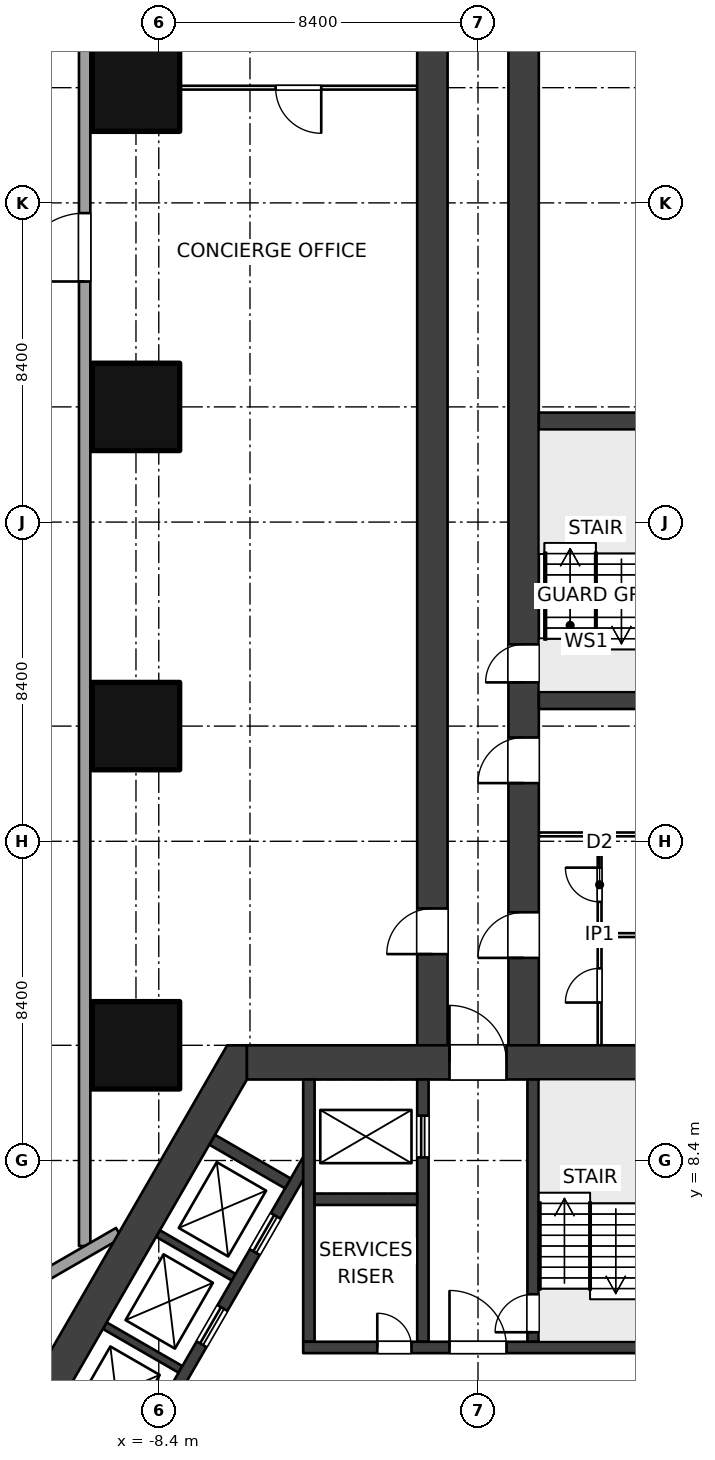
"""IFC4 building model, lengths in metres.
Left out: names, types, materials, properties, quantities, classifications, styles, units other than length and angle.
Written with IfcOpenShell. Run it as: python <this file> out.ifc"""

import sys

from ifc_helpers import new_model, si_unit, direction, frame, frame_2d, origin, origin_2d, place, context, subcontext, project, spatial, polyline, rectangle, outline, extrude, element, fill, save


model = new_model("IFC4")
c1 = context("Model", 3, precision=1e-05, world=origin(), true_north=direction((0.0, 1.0)))
c2 = subcontext(c1, "Body", "Model", "MODEL_VIEW")
j1 = project(units=[si_unit("LENGTHUNIT", "METRE"), si_unit("PLANEANGLEUNIT", "RADIAN")], contexts=[c1])
p1 = place(None, origin())
s1 = spatial("IfcSite", under=j1, at=p1, CompositionType="ELEMENT")
p2 = place(p1, origin())
s2 = spatial("IfcBuilding", under=s1, at=p2, CompositionType="ELEMENT")
p3 = place(p2, origin())
s3 = spatial("IfcBuildingStorey", under=s2, at=p3, CompositionType="ELEMENT", Elevation=0.0)
for number, where, z_axis, x_axis in (
    (1, (-9.0, 11.432, 0.0), (0.0, 0.0, 1.0), (1.0, 0.0, 0.0)),
    (2, (-9.0, 19.832, 0.0), (0.0, 0.0, 1.0), (1.0, 0.0, 0.0)),
    (3, (-9.0, 28.231, 0.0), (0.0, 0.0, 1.0), (1.0, 0.0, 0.0)),
    (4, (-9.0, 36.632, 0.0), (0.0, 0.0, 1.0), (1.0, 0.0, 0.0)),
):
    element("IfcColumn", number, at=place(p3, frame(where, z_axis=z_axis, x_axis=x_axis)), inside=s3, PredefinedType="COLUMN", context=c2, shape_type="SweptSolid", body=[
        extrude(rectangle(XDim=2.3, YDim=2.3, at=origin_2d()), origin(), (0.0, 0.0, 1.0), 6.0),
    ])
p4 = place(p3, frame((-6.08, 10.981, 0.0), z_axis=(0.0, 0.0, 1.0), x_axis=(1.0, 0.0, 0.0)))
e5 = element("IfcWall", 5, at=p4, inside=s3, PredefinedType="SHEAR", context=c2, shape_type="SweptSolid", body=[
    extrude(rectangle(XDim=12.161, YDim=0.9, at=frame_2d((6.08, 0.0))), origin(), (0.0, 0.0, 1.0), 6.0),
])
p5 = place(p4, frame((5.33, 0.0, 0.0)))
e6 = element("IfcOpeningElement", 6, at=p5, cuts=e5, PredefinedType="OPENING", context=c2, shape_type="SweptSolid", body=[
    extrude(rectangle(XDim=1.5, YDim=2.1, at=frame_2d((0.75, 1.05))), frame((0.0, 0.46, 0.0), z_axis=(0.0, -1.0, 0.0), x_axis=(1.0, 0.0, 0.0)), (0.0, 0.0, 1.0), 0.92),
])
p6 = place(p3, origin())
e7 = element("IfcWall", 7, at=p6, inside=s3, PredefinedType="SHEAR", context=c2, shape_type="SweptSolid", body=[
    extrude(outline(polyline([(-6.6, 11.432), (-13.2, 0.0), (-12.94, -0.45), (-12.161, 0.0), (-6.08, 10.531), (-6.08, 11.432), (-6.6, 11.432)])), origin(), (0.0, 0.0, 1.0), 6.0),
])
p7 = place(p3, frame((-4.6, 3.48, 0.0), z_axis=(0.0, 0.0, 1.0), x_axis=(1.0, 0.0, 0.0)))
e8 = element("IfcWall", 8, at=p7, inside=s3, PredefinedType="SHEAR", context=c2, shape_type="SweptSolid", body=[
    extrude(rectangle(XDim=9.2, YDim=0.3, at=frame_2d((4.6, 0.0))), origin(), (0.0, 0.0, 1.0), 6.0),
])
p8 = place(p7, frame((3.85, 0.0, 0.0)))
e9 = element("IfcOpeningElement", 9, at=p8, cuts=e8, PredefinedType="OPENING", context=c2, shape_type="SweptSolid", body=[
    extrude(rectangle(XDim=1.5, YDim=2.1, at=frame_2d((0.75, 1.05))), frame((0.0, 0.16, 0.0), z_axis=(0.0, -1.0, 0.0), x_axis=(1.0, 0.0, 0.0)), (0.0, 0.0, 1.0), 0.32),
])
p9 = place(p7, frame((1.95, 0.0, 0.0)))
e10 = element("IfcOpeningElement", 10, at=p9, cuts=e8, PredefinedType="OPENING", context=c2, shape_type="SweptSolid", body=[
    extrude(rectangle(XDim=0.9, YDim=2.1, at=frame_2d((0.45, 1.05))), frame((0.0, 0.16, 0.0), z_axis=(0.0, -1.0, 0.0), x_axis=(1.0, 0.0, 0.0)), (0.0, 0.0, 1.0), 0.32),
])
p10 = place(p3, frame((1.45, 3.63, 0.0), z_axis=(0.0, 0.0, 1.0), x_axis=(0.0, 1.0, 0.0)))
e11 = element("IfcWall", 11, at=p10, inside=s3, PredefinedType="SHEAR", context=c2, shape_type="SweptSolid", body=[
    extrude(rectangle(XDim=6.902, YDim=0.3, at=frame_2d((3.451, 0.0))), origin(), (0.0, 0.0, 1.0), 6.0),
])
p11 = place(p10, frame((0.25, 0.0, 0.0)))
e12 = element("IfcOpeningElement", 12, at=p11, cuts=e11, PredefinedType="OPENING", context=c2, shape_type="SweptSolid", body=[
    extrude(rectangle(XDim=1.0, YDim=2.1, at=frame_2d((0.5, 1.05))), frame((0.0, 0.16, 0.0), z_axis=(0.0, -1.0, 0.0), x_axis=(1.0, 0.0, 0.0)), (0.0, 0.0, 1.0), 0.32),
])
p12 = place(p3, frame((-1.45, 3.63, 0.0), z_axis=(0.0, 0.0, 1.0), x_axis=(0.0, 1.0, 0.0)))
e13 = element("IfcWall", 13, at=p12, inside=s3, PredefinedType="SHEAR", context=c2, shape_type="SweptSolid", body=[
    extrude(rectangle(XDim=6.902, YDim=0.3, at=frame_2d((3.451, 0.0))), origin(), (0.0, 0.0, 1.0), 6.0),
])
p13 = place(p12, frame((4.85, 0.0, 0.0)))
e14 = element("IfcOpeningElement", 14, at=p13, cuts=e13, PredefinedType="OPENING", context=c2, shape_type="SweptSolid", body=[
    extrude(rectangle(XDim=1.1, YDim=2.1, at=frame_2d((0.55, 1.05))), frame((0.0, 0.16, 0.0), z_axis=(0.0, -1.0, 0.0), x_axis=(1.0, 0.0, 0.0)), (0.0, 0.0, 1.0), 0.32),
])
p14 = place(p3, frame((-4.45, 3.63, 0.0), z_axis=(0.0, 0.0, 1.0), x_axis=(0.0, 1.0, 0.0)))
e15 = element("IfcWall", 15, at=p14, inside=s3, PredefinedType="SHEAR", context=c2, shape_type="SweptSolid", body=[
    extrude(rectangle(XDim=6.902, YDim=0.3, at=frame_2d((3.451, 0.0))), origin(), (0.0, 0.0, 1.0), 6.0),
])
p15 = place(p3, frame((-4.3, 7.38, 0.0), z_axis=(0.0, 0.0, 1.0), x_axis=(1.0, 0.0, 0.0)))
e16 = element("IfcWall", 16, at=p15, inside=s3, PredefinedType="SHEAR", context=c2, shape_type="SweptSolid", body=[
    extrude(rectangle(XDim=2.7, YDim=0.3, at=frame_2d((1.35, 0.0))), origin(), (0.0, 0.0, 1.0), 6.0),
])
p16 = place(p3, frame((-9.548, -0.374, 0.0), z_axis=(0.0, 0.0, 1.0), x_axis=(0.500002290144, 0.866024081565, 0.0)))
e17 = element("IfcWall", 17, at=p16, inside=s3, PredefinedType="SHEAR", context=c2, shape_type="SweptSolid", body=[
    extrude(rectangle(XDim=10.195, YDim=0.3, at=frame_2d((5.098, 0.0))), origin(), (0.0, 0.0, 1.0), 6.0),
])
p17 = place(p16, frame((1.748, 0.0, 0.0)))
e18 = element("IfcOpeningElement", 18, at=p17, cuts=e17, PredefinedType="OPENING", context=c2, shape_type="SweptSolid", body=[
    extrude(rectangle(XDim=1.1, YDim=2.1, at=frame_2d((0.55, 1.05))), frame((0.0, 0.16, 0.0), z_axis=(0.0, -1.0, 0.0), x_axis=(1.0, 0.0, 0.0)), (0.0, 0.0, 1.0), 0.32),
])
p18 = place(p16, frame((4.548, 0.0, 0.0)))
e19 = element("IfcOpeningElement", 19, at=p18, cuts=e17, PredefinedType="OPENING", context=c2, shape_type="SweptSolid", body=[
    extrude(rectangle(XDim=1.1, YDim=2.1, at=frame_2d((0.55, 1.05))), frame((0.0, 0.16, 0.0), z_axis=(0.0, -1.0, 0.0), x_axis=(1.0, 0.0, 0.0)), (0.0, 0.0, 1.0), 0.32),
])
p19 = place(p16, frame((7.348, 0.0, 0.0)))
e20 = element("IfcOpeningElement", 20, at=p19, cuts=e17, PredefinedType="OPENING", context=c2, shape_type="SweptSolid", body=[
    extrude(rectangle(XDim=1.1, YDim=2.1, at=frame_2d((0.55, 1.05))), frame((0.0, 0.16, 0.0), z_axis=(0.0, -1.0, 0.0), x_axis=(1.0, 0.0, 0.0)), (0.0, 0.0, 1.0), 0.32),
])
p20 = place(p3, frame((-5.004, 7.796, 0.0), z_axis=(0.0, 0.0, 1.0), x_axis=(-0.866053019151, 0.499952165731, 0.0)))
e21 = element("IfcWall", 21, at=p20, inside=s3, PredefinedType="SHEAR", context=c2, shape_type="SweptSolid", body=[
    extrude(rectangle(XDim=2.3, YDim=0.3, at=frame_2d((1.15, 0.0))), origin(), (0.0, 0.0, 1.0), 6.0),
])
for number, where, z_axis, x_axis in (
    (22, (-7.829, 2.903, 0.0), (0.0, 0.0, 1.0), (-0.866, 0.5, 0.0)),
    (23, (-6.429, 5.328, 0.0), (0.0, 0.0, 1.0), (-0.866, 0.5, 0.0)),
):
    element("IfcWall", number, at=place(p3, frame(where, z_axis=z_axis, x_axis=x_axis)), inside=s3, PredefinedType="SHEAR", context=c2, shape_type="SweptSolid", body=[
        extrude(rectangle(XDim=2.3, YDim=0.2, at=frame_2d((1.15, 0.0))), origin(), (0.0, 0.0, 1.0), 6.0),
    ])
p21 = place(p3, frame((-1.2, 10.981, 0.0), z_axis=(0.0, 0.0, 1.0), x_axis=(0.0, 1.0, 0.0)))
e24 = element("IfcWall", 24, at=p21, inside=s3, PredefinedType="SHEAR", context=c2, shape_type="SweptSolid", body=[
    extrude(rectangle(XDim=36.75, YDim=0.8, at=frame_2d((18.375, 0.0))), origin(), (0.0, 0.0, 1.0), 6.0),
])
p22 = place(p21, frame((2.85, 0.0, 0.0)))
e25 = element("IfcOpeningElement", 25, at=p22, cuts=e24, PredefinedType="OPENING", context=c2, shape_type="SweptSolid", body=[
    extrude(rectangle(XDim=1.2, YDim=2.1, at=frame_2d((0.6, 1.05))), frame((0.0, 0.41, 0.0), z_axis=(0.0, -1.0, 0.0), x_axis=(1.0, 0.0, 0.0)), (0.0, 0.0, 1.0), 0.82),
])
p23 = place(p3, frame((1.2, 10.981, 0.0), z_axis=(0.0, 0.0, 1.0), x_axis=(0.0, 1.0, 0.0)))
e26 = element("IfcWall", 26, at=p23, inside=s3, PredefinedType="SHEAR", context=c2, shape_type="SweptSolid", body=[
    extrude(rectangle(XDim=36.75, YDim=0.8, at=frame_2d((18.375, 0.0))), origin(), (0.0, 0.0, 1.0), 6.0),
])
p24 = place(p23, frame((10.0, 0.0, 0.0)))
e27 = element("IfcOpeningElement", 27, at=p24, cuts=e26, PredefinedType="OPENING", context=c2, shape_type="SweptSolid", body=[
    extrude(rectangle(XDim=1.0, YDim=2.1, at=frame_2d((0.5, 1.05))), frame((0.0, 0.41, 0.0), z_axis=(0.0, -1.0, 0.0), x_axis=(1.0, 0.0, 0.0)), (0.0, 0.0, 1.0), 0.82),
])
p25 = place(p23, frame((2.75, 0.0, 0.0)))
e28 = element("IfcOpeningElement", 28, at=p25, cuts=e26, PredefinedType="OPENING", context=c2, shape_type="SweptSolid", body=[
    extrude(rectangle(XDim=1.2, YDim=2.1, at=frame_2d((0.6, 1.05))), frame((0.0, 0.41, 0.0), z_axis=(0.0, -1.0, 0.0), x_axis=(1.0, 0.0, 0.0)), (0.0, 0.0, 1.0), 0.82),
])
p26 = place(p23, frame((7.35, 0.0, 0.0)))
e29 = element("IfcOpeningElement", 29, at=p26, cuts=e26, PredefinedType="OPENING", context=c2, shape_type="SweptSolid", body=[
    extrude(rectangle(XDim=1.2, YDim=2.1, at=frame_2d((0.6, 1.05))), frame((0.0, 0.41, 0.0), z_axis=(0.0, -1.0, 0.0), x_axis=(1.0, 0.0, 0.0)), (0.0, 0.0, 1.0), 0.82),
])
p27 = place(p3, frame((-1.6, 36.632, 0.0), z_axis=(0.0, 0.0, 1.0), x_axis=(-1.0, 0.0, 0.0)))
e30 = element("IfcWall", 30, at=p27, inside=s3, PredefinedType="PARTITIONING", context=c2, shape_type="SweptSolid", body=[
    extrude(rectangle(XDim=6.25, YDim=0.1, at=frame_2d((3.125, 0.0))), origin(), (0.0, 0.0, 1.0), 3.9),
])
p28 = place(p27, frame((2.525, 0.0, 0.0)))
e31 = element("IfcOpeningElement", 31, at=p28, cuts=e30, PredefinedType="OPENING", context=c2, shape_type="SweptSolid", body=[
    extrude(rectangle(XDim=1.2, YDim=2.1, at=frame_2d((0.6, 1.05))), frame((0.0, 0.06, 0.0), z_axis=(0.0, -1.0, 0.0), x_axis=(1.0, 0.0, 0.0)), (0.0, 0.0, 1.0), 0.12),
])
p29 = place(p3, frame((3.2, 11.432, 0.0), z_axis=(0.0, 0.0, 1.0), x_axis=(0.0, 1.0, 0.0)))
e32 = element("IfcWall", 32, at=p29, inside=s3, PredefinedType="PARTITIONING", context=c2, shape_type="SweptSolid", body=[
    extrude(rectangle(XDim=5.6, YDim=0.1, at=frame_2d((2.8, 0.0))), origin(), (0.0, 0.0, 1.0), 5.7),
])
p30 = place(p29, frame((1.125, 0.0, 0.0)))
e33 = element("IfcOpeningElement", 33, at=p30, cuts=e32, PredefinedType="OPENING", context=c2, shape_type="SweptSolid", body=[
    extrude(rectangle(XDim=0.9, YDim=2.1, at=frame_2d((0.45, 1.05))), frame((0.0, 0.06, 0.0), z_axis=(0.0, -1.0, 0.0), x_axis=(1.0, 0.0, 0.0)), (0.0, 0.0, 1.0), 0.12),
])
p31 = place(p29, frame((3.775, 0.0, 0.0)))
e34 = element("IfcOpeningElement", 34, at=p31, cuts=e32, PredefinedType="OPENING", context=c2, shape_type="SweptSolid", body=[
    extrude(rectangle(XDim=0.9, YDim=2.1, at=frame_2d((0.45, 1.05))), frame((0.0, 0.06, 0.0), z_axis=(0.0, -1.0, 0.0), x_axis=(1.0, 0.0, 0.0)), (0.0, 0.0, 1.0), 0.12),
])
p32 = place(p3, frame((3.25, 14.332, 0.0), z_axis=(0.0, 0.0, 1.0), x_axis=(1.0, 0.0, 0.0)))
e35 = element("IfcWall", 35, at=p32, inside=s3, PredefinedType="PARTITIONING", context=c2, shape_type="SweptSolid", body=[
    extrude(rectangle(XDim=1.5, YDim=0.1, at=frame_2d((0.75, 0.0))), origin(), (0.0, 0.0, 1.0), 5.7),
])
p33 = place(p3, frame((1.6, 16.981, 0.0), z_axis=(0.0, 0.0, 1.0), x_axis=(1.0, 0.0, 0.0)))
e36 = element("IfcWall", 36, at=p33, inside=s3, PredefinedType="PARTITIONING", context=c2, shape_type="SweptSolid", body=[
    extrude(rectangle(XDim=3.15, YDim=0.1, at=frame_2d((1.575, 0.0))), origin(), (0.0, 0.0, 1.0), 5.7),
])
p34 = place(p3, frame((-10.35, 6.149, 0.0), z_axis=(0.0, 0.0, 1.0), x_axis=(0.0, 1.0, 0.0)))
e37 = element("IfcWall", 37, at=p34, inside=s3, PredefinedType="SOLIDWALL", context=c2, shape_type="SweptSolid", body=[
    extrude(rectangle(XDim=41.883, YDim=0.3, at=frame_2d((20.941, 0.0))), origin(), (0.0, 0.0, 1.0), 5.7),
])
p35 = place(p34, frame((25.383, 0.0, 0.0)))
e38 = element("IfcOpeningElement", 38, at=p35, cuts=e37, PredefinedType="OPENING", context=c2, shape_type="SweptSolid", body=[
    extrude(rectangle(XDim=1.8, YDim=2.4, at=frame_2d((0.9, 1.2))), frame((0.0, 0.16, 0.0), z_axis=(0.0, -1.0, 0.0), x_axis=(1.0, 0.0, 0.0)), (0.0, 0.0, 1.0), 0.32),
])
p36 = place(p3, frame((-9.45, 6.495, 0.0), z_axis=(0.0, 0.0, 1.0), x_axis=(-0.866025301493, -0.500000177174, 0.0)))
e39 = element("IfcWall", 39, at=p36, inside=s3, PredefinedType="SOLIDWALL", context=c2, shape_type="SweptSolid", body=[
    extrude(rectangle(XDim=43.095, YDim=0.3, at=frame_2d((21.548, 0.0))), origin(), (0.0, 0.0, 1.0), 5.7),
])
p37 = place(p36, frame((26.595, 0.0, 0.0)))
e40 = element("IfcOpeningElement", 40, at=p37, cuts=e39, PredefinedType="OPENING", context=c2, shape_type="SweptSolid", body=[
    extrude(rectangle(XDim=1.8, YDim=2.4, at=frame_2d((0.9, 1.2))), frame((0.0, 0.16, 0.0), z_axis=(0.0, -1.0, 0.0), x_axis=(1.0, 0.0, 0.0)), (0.0, 0.0, 1.0), 0.32),
])
for number, where, z_axis, x_axis in (
    (41, (1.6, 20.507, 0.0), (0.0, 0.0, 1.0), (1.0, 0.0, 0.0)),
    (42, (1.6, 27.856, 0.0), (0.0, 0.0, 1.0), (1.0, 0.0, 0.0)),
):
    element("IfcWall", number, at=place(p3, frame(where, z_axis=z_axis, x_axis=x_axis)), inside=s3, PredefinedType="SOLIDWALL", context=c2, shape_type="SweptSolid", body=[
        extrude(rectangle(XDim=3.3, YDim=0.45, at=frame_2d((1.65, 0.0))), origin(), (0.0, 0.0, 1.0), 6.0),
    ])
p38 = place(p18, origin())
e43 = element("IfcDoor", 43, at=p38, inside=s3, OperationType="DOUBLE_DOOR_SLIDING", PredefinedType="DOOR", context=c2, shape_type="SweptSolid", body=[
    extrude(rectangle(XDim=1.1, YDim=2.1, at=frame_2d((0.55, 1.05))), frame((0.0, 0.025, 0.0), z_axis=(0.0, -1.0, 0.0), x_axis=(1.0, 0.0, 0.0)), (0.0, 0.0, 1.0), 0.05),
])
fill(e19, e43)
p39 = place(p19, origin())
e44 = element("IfcDoor", 44, at=p39, inside=s3, OperationType="DOUBLE_DOOR_SLIDING", PredefinedType="DOOR", context=c2, shape_type="SweptSolid", body=[
    extrude(rectangle(XDim=1.1, YDim=2.1, at=frame_2d((0.55, 1.05))), frame((0.0, 0.025, 0.0), z_axis=(0.0, -1.0, 0.0), x_axis=(1.0, 0.0, 0.0)), (0.0, 0.0, 1.0), 0.05),
])
fill(e20, e44)
p40 = place(p13, origin())
e45 = element("IfcDoor", 45, at=p40, inside=s3, OperationType="DOUBLE_DOOR_SLIDING", PredefinedType="DOOR", context=c2, shape_type="SweptSolid", body=[
    extrude(rectangle(XDim=1.1, YDim=2.1, at=frame_2d((0.55, 1.05))), frame((0.0, 0.025, 0.0), z_axis=(0.0, -1.0, 0.0), x_axis=(1.0, 0.0, 0.0)), (0.0, 0.0, 1.0), 0.05),
])
fill(e14, e45)
p41 = place(p8, origin())
e46 = element("IfcDoor", 46, at=p41, inside=s3, OperationType="DOUBLE_DOOR_DOUBLE_SWING", PredefinedType="DOOR", context=c2, shape_type="SweptSolid", body=[
    extrude(rectangle(XDim=1.5, YDim=2.1, at=frame_2d((0.75, 1.05))), frame((0.0, 0.025, 0.0), z_axis=(0.0, -1.0, 0.0), x_axis=(1.0, 0.0, 0.0)), (0.0, 0.0, 1.0), 0.05),
])
fill(e9, e46)
p42 = place(p9, origin())
e47 = element("IfcDoor", 47, at=p42, inside=s3, OperationType="SINGLE_SWING_LEFT", PredefinedType="DOOR", context=c2, shape_type="SweptSolid", body=[
    extrude(rectangle(XDim=0.9, YDim=2.1, at=frame_2d((0.45, 1.05))), frame((0.0, 0.025, 0.0), z_axis=(0.0, -1.0, 0.0), x_axis=(1.0, 0.0, 0.0)), (0.0, 0.0, 1.0), 0.05),
])
fill(e10, e47)
p43 = place(p11, origin())
e48 = element("IfcDoor", 48, at=p43, inside=s3, OperationType="SINGLE_SWING_LEFT", PredefinedType="DOOR", context=c2, shape_type="SweptSolid", body=[
    extrude(rectangle(XDim=1.0, YDim=2.1, at=frame_2d((0.5, 1.05))), frame((0.0, 0.025, 0.0), z_axis=(0.0, -1.0, 0.0), x_axis=(1.0, 0.0, 0.0)), (0.0, 0.0, 1.0), 0.05),
])
fill(e12, e48)
p44 = place(p5, origin())
e49 = element("IfcDoor", 49, at=p44, inside=s3, OperationType="DOUBLE_DOOR_DOUBLE_SWING", PredefinedType="DOOR", context=c2, shape_type="SweptSolid", body=[
    extrude(rectangle(XDim=1.5, YDim=2.1, at=frame_2d((0.75, 1.05))), frame((0.0, 0.025, 0.0), z_axis=(0.0, -1.0, 0.0), x_axis=(1.0, 0.0, 0.0)), (0.0, 0.0, 1.0), 0.05),
])
fill(e6, e49)
p45 = place(p24, origin())
e50 = element("IfcDoor", 50, at=p45, inside=s3, OperationType="SINGLE_SWING_LEFT", PredefinedType="DOOR", context=c2, shape_type="SweptSolid", body=[
    extrude(rectangle(XDim=1.0, YDim=2.1, at=frame_2d((0.5, 1.05))), frame((0.0, 0.025, 0.0), z_axis=(0.0, -1.0, 0.0), x_axis=(1.0, 0.0, 0.0)), (0.0, 0.0, 1.0), 0.05),
])
fill(e27, e50)
p46 = place(p28, origin())
e51 = element("IfcDoor", 51, at=p46, inside=s3, OperationType="DOUBLE_SWING_LEFT", PredefinedType="DOOR", context=c2, shape_type="SweptSolid", body=[
    extrude(rectangle(XDim=1.2, YDim=2.1, at=frame_2d((0.6, 1.05))), frame((0.0, 0.025, 0.0), z_axis=(0.0, -1.0, 0.0), x_axis=(1.0, 0.0, 0.0)), (0.0, 0.0, 1.0), 0.05),
])
fill(e31, e51)
p47 = place(p22, origin())
e52 = element("IfcDoor", 52, at=p47, inside=s3, OperationType="DOUBLE_SWING_LEFT", PredefinedType="DOOR", context=c2, shape_type="SweptSolid", body=[
    extrude(rectangle(XDim=1.2, YDim=2.1, at=frame_2d((0.6, 1.05))), frame((0.0, 0.025, 0.0), z_axis=(0.0, -1.0, 0.0), x_axis=(1.0, 0.0, 0.0)), (0.0, 0.0, 1.0), 0.05),
])
fill(e25, e52)
p48 = place(p30, origin())
e53 = element("IfcDoor", 53, at=p48, inside=s3, OperationType="SINGLE_SWING_LEFT", PredefinedType="DOOR", context=c2, shape_type="SweptSolid", body=[
    extrude(rectangle(XDim=0.9, YDim=2.1, at=frame_2d((0.45, 1.05))), frame((0.0, 0.025, 0.0), z_axis=(0.0, -1.0, 0.0), x_axis=(1.0, 0.0, 0.0)), (0.0, 0.0, 1.0), 0.05),
])
fill(e33, e53)
p49 = place(p31, origin())
e54 = element("IfcDoor", 54, at=p49, inside=s3, OperationType="SINGLE_SWING_RIGHT", PredefinedType="DOOR", context=c2, shape_type="SweptSolid", body=[
    extrude(rectangle(XDim=0.9, YDim=2.1, at=frame_2d((0.45, 1.05))), frame((0.0, 0.025, 0.0), z_axis=(0.0, -1.0, 0.0), x_axis=(1.0, 0.0, 0.0)), (0.0, 0.0, 1.0), 0.05),
])
fill(e34, e54)
p50 = place(p25, origin())
e55 = element("IfcDoor", 55, at=p50, inside=s3, OperationType="DOUBLE_SWING_LEFT", PredefinedType="DOOR", context=c2, shape_type="SweptSolid", body=[
    extrude(rectangle(XDim=1.2, YDim=2.1, at=frame_2d((0.6, 1.05))), frame((0.0, 0.025, 0.0), z_axis=(0.0, -1.0, 0.0), x_axis=(1.0, 0.0, 0.0)), (0.0, 0.0, 1.0), 0.05),
])
fill(e28, e55)
p51 = place(p26, origin())
e56 = element("IfcDoor", 56, at=p51, inside=s3, OperationType="DOUBLE_SWING_LEFT", PredefinedType="DOOR", context=c2, shape_type="SweptSolid", body=[
    extrude(rectangle(XDim=1.2, YDim=2.1, at=frame_2d((0.6, 1.05))), frame((0.0, 0.025, 0.0), z_axis=(0.0, -1.0, 0.0), x_axis=(1.0, 0.0, 0.0)), (0.0, 0.0, 1.0), 0.05),
])
fill(e29, e56)
p52 = place(p35, origin())
e57 = element("IfcDoor", 57, at=p52, inside=s3, OperationType="DOUBLE_DOOR_DOUBLE_SWING", PredefinedType="DOOR", context=c2, shape_type="SweptSolid", body=[
    extrude(rectangle(XDim=1.8, YDim=2.4, at=frame_2d((0.9, 1.2))), frame((0.0, 0.025, 0.0), z_axis=(0.0, -1.0, 0.0), x_axis=(1.0, 0.0, 0.0)), (0.0, 0.0, 1.0), 0.05),
])
fill(e38, e57)
save(model, sys.argv[1])
